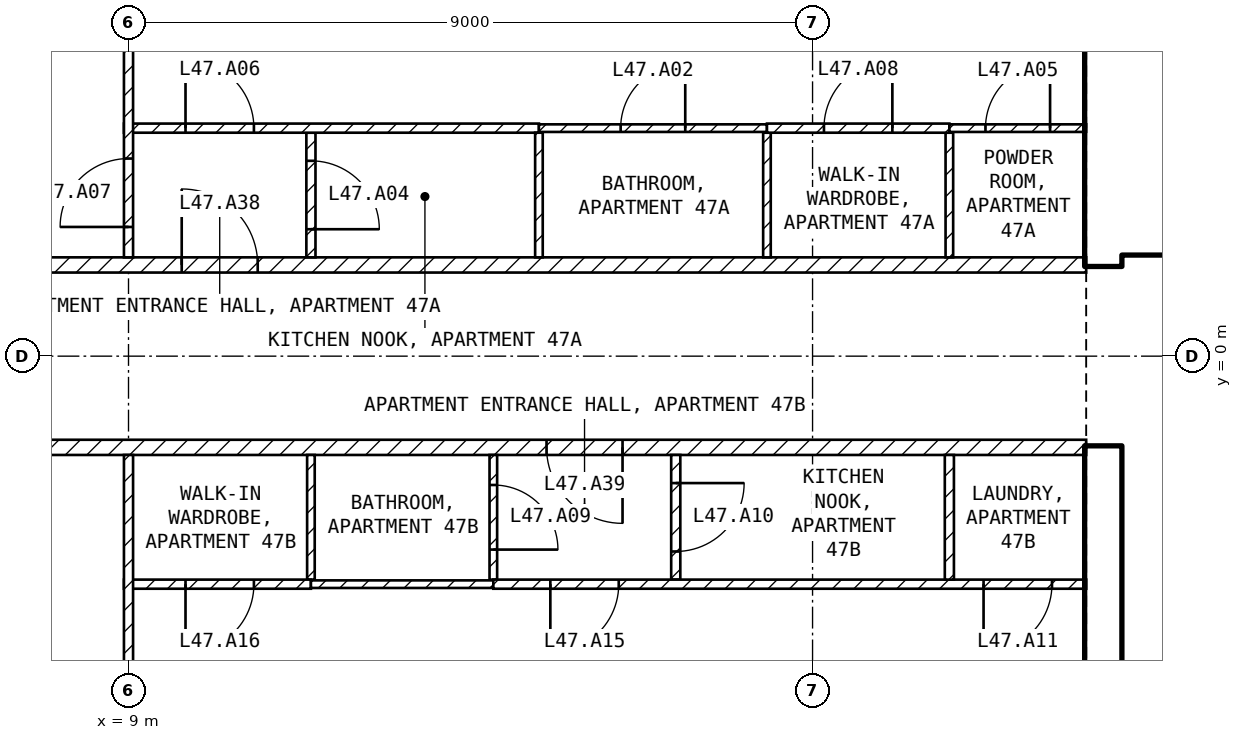
"""IFC4 building model, lengths in metres.
Left out: names, types, materials, properties, quantities, classifications, styles, units other than length and angle.
Written with IfcOpenShell. Run it as: python <this file> out.ifc"""

import sys

from ifc_helpers import new_model, si_unit, direction, frame, frame_2d, origin, place, context, subcontext, project, spatial, rectangle, extrude, element, fill, save


model = new_model("IFC4")
c1 = context("Model", 3, precision=1e-05, world=origin(), true_north=direction((0.0, 1.0)))
c2 = subcontext(c1, "Body", "Model", "MODEL_VIEW")
j1 = project(units=[si_unit("LENGTHUNIT", "METRE"), si_unit("PLANEANGLEUNIT", "RADIAN")], contexts=[c1])
p1 = place(None, origin())
s1 = spatial("IfcSite", under=j1, at=p1, CompositionType="ELEMENT")
p2 = place(p1, origin())
s2 = spatial("IfcBuilding", under=s1, at=p2, CompositionType="ELEMENT")
p3 = place(p2, frame((0.0, 0.0, 191.1)))
s3 = spatial("IfcBuildingStorey", under=s2, at=p3, CompositionType="ELEMENT", Elevation=191.1)
for number, where, z_axis, x_axis in (
    (1, (21.825, -8.1, 0.0), (0.0, 0.0, 1.0), (0.0, 1.0, 0.0)),
    (2, (21.825, 1.2, 0.0), (0.0, 0.0, 1.0), (0.0, 1.0, 0.0)),
):
    element("IfcWall", number, at=place(p3, frame(where, z_axis=z_axis, x_axis=x_axis)), inside=s3, PredefinedType="SHEAR", context=c2, shape_type="SweptSolid", body=[
        extrude(rectangle(XDim=6.9, YDim=0.45, at=frame_2d((3.45, 0.0))), origin(), (0.0, 0.0, 1.0), 3.25),
    ])
p4 = place(p3, frame((22.05, 1.45, 0.0), z_axis=(0.0, 0.0, 1.0), x_axis=(1.0, 0.0, 0.0)))
e3 = element("IfcWall", 3, at=p4, inside=s3, PredefinedType="SOLIDWALL", context=c2, shape_type="SweptSolid", body=[
    extrude(rectangle(XDim=11.15, YDim=0.2, at=frame_2d((5.575, 0.0))), origin(), (0.0, 0.0, 1.0), 3.25),
])
p5 = place(p4, frame((0.75, 0.0, 0.0)))
e4 = element("IfcOpeningElement", 4, at=p5, cuts=e3, PredefinedType="OPENING", context=c2, shape_type="SweptSolid", body=[
    extrude(rectangle(XDim=1.0, YDim=2.1, at=frame_2d((0.5, 1.05))), frame((0.0, 0.11, 0.0), z_axis=(0.0, -1.0, 0.0), x_axis=(1.0, 0.0, 0.0)), (0.0, 0.0, 1.0), 0.22),
])
p6 = place(p4, frame((3.25, 0.0, 0.0)))
e5 = element("IfcOpeningElement", 5, at=p6, cuts=e3, PredefinedType="OPENING", context=c2, shape_type="SweptSolid", body=[
    extrude(rectangle(XDim=1.0, YDim=2.1, at=frame_2d((0.5, 1.05))), frame((0.0, 0.11, 0.0), z_axis=(0.0, -1.0, 0.0), x_axis=(1.0, 0.0, 0.0)), (0.0, 0.0, 1.0), 0.22),
])
p7 = place(p4, frame((9.15, 0.0, 0.0)))
e6 = element("IfcOpeningElement", 6, at=p7, cuts=e3, PredefinedType="OPENING", context=c2, shape_type="SweptSolid", body=[
    extrude(rectangle(XDim=0.9, YDim=2.1, at=frame_2d((0.45, 1.05))), frame((0.0, 0.11, 0.0), z_axis=(0.0, -1.0, 0.0), x_axis=(1.0, 0.0, 0.0)), (0.0, 0.0, 1.0), 0.22),
])
p8 = place(p3, frame((4.4, 1.2, 0.0), z_axis=(0.0, 0.0, 1.0), x_axis=(1.0, 0.0, 0.0)))
e7 = element("IfcWall", 7, at=p8, inside=s3, PredefinedType="PARTITIONING", context=c2, shape_type="SweptSolid", body=[
    extrude(rectangle(XDim=17.2, YDim=0.2, at=frame_2d((8.6, 0.0))), origin(), (0.0, 0.0, 1.0), 3.25),
])
p9 = place(p8, frame((5.3, 0.0, 0.0)))
e8 = element("IfcOpeningElement", 8, at=p9, cuts=e7, PredefinedType="OPENING", context=c2, shape_type="SweptSolid", body=[
    extrude(rectangle(XDim=1.0, YDim=2.1, at=frame_2d((0.5, 1.05))), frame((0.0, 0.11, 0.0), z_axis=(0.0, -1.0, 0.0), x_axis=(1.0, 0.0, 0.0)), (0.0, 0.0, 1.0), 0.22),
])
p10 = place(p3, frame((21.6, -1.2, 0.0), z_axis=(0.0, 0.0, 1.0), x_axis=(-1.0, 0.0, 0.0)))
e9 = element("IfcWall", 9, at=p10, inside=s3, PredefinedType="PARTITIONING", context=c2, shape_type="SweptSolid", body=[
    extrude(rectangle(XDim=17.2, YDim=0.2, at=frame_2d((8.6, 0.0))), origin(), (0.0, 0.0, 1.0), 3.25),
])
p11 = place(p10, frame((6.1, 0.0, 0.0)))
e10 = element("IfcOpeningElement", 10, at=p11, cuts=e9, PredefinedType="OPENING", context=c2, shape_type="SweptSolid", body=[
    extrude(rectangle(XDim=1.0, YDim=2.1, at=frame_2d((0.5, 1.05))), frame((0.0, 0.11, 0.0), z_axis=(0.0, -1.0, 0.0), x_axis=(1.0, 0.0, 0.0)), (0.0, 0.0, 1.0), 0.22),
])
p12 = place(p3, frame((11.4, 2.94, 0.0), z_axis=(0.0, 0.0, 1.0), x_axis=(0.0, -1.0, 0.0)))
e11 = element("IfcWall", 11, at=p12, inside=s3, PredefinedType="PARTITIONING", context=c2, shape_type="SweptSolid", body=[
    extrude(rectangle(XDim=1.64, YDim=0.12, at=frame_2d((0.82, 0.0))), origin(), (0.0, 0.0, 1.0), 3.25),
])
p13 = place(p12, frame((0.37, 0.0, 0.0)))
e12 = element("IfcOpeningElement", 12, at=p13, cuts=e11, PredefinedType="OPENING", context=c2, shape_type="SweptSolid", body=[
    extrude(rectangle(XDim=0.9, YDim=2.1, at=frame_2d((0.45, 1.05))), frame((0.0, 0.07, 0.0), z_axis=(0.0, -1.0, 0.0), x_axis=(1.0, 0.0, 0.0)), (0.0, 0.0, 1.0), 0.14),
])
p14 = place(p3, frame((8.94, 3.0, 0.0), z_axis=(0.0, 0.0, 1.0), x_axis=(1.0, 0.0, 0.0)))
e13 = element("IfcWall", 13, at=p14, inside=s3, PredefinedType="PARTITIONING", context=c2, shape_type="SweptSolid", body=[
    extrude(rectangle(XDim=5.46, YDim=0.12, at=frame_2d((2.73, 0.0))), origin(), (0.0, 0.0, 1.0), 3.25),
])
p15 = place(p14, frame((0.81, 0.0, 0.0)))
e14 = element("IfcOpeningElement", 14, at=p15, cuts=e13, PredefinedType="OPENING", context=c2, shape_type="SweptSolid", body=[
    extrude(rectangle(XDim=0.9, YDim=2.1, at=frame_2d((0.45, 1.05))), frame((0.0, 0.07, 0.0), z_axis=(0.0, -1.0, 0.0), x_axis=(1.0, 0.0, 0.0)), (0.0, 0.0, 1.0), 0.14),
])
p16 = place(p3, frame((9.0, 1.3, 0.0), z_axis=(0.0, 0.0, 1.0), x_axis=(0.0, 1.0, 0.0)))
e15 = element("IfcWall", 15, at=p16, inside=s3, PredefinedType="PARTITIONING", context=c2, shape_type="SweptSolid", body=[
    extrude(rectangle(XDim=7.62, YDim=0.12, at=frame_2d((3.81, 0.0))), origin(), (0.0, 0.0, 1.0), 3.25),
])
p17 = place(p16, frame((0.4, 0.0, 0.0)))
e16 = element("IfcOpeningElement", 16, at=p17, cuts=e15, PredefinedType="OPENING", context=c2, shape_type="SweptSolid", body=[
    extrude(rectangle(XDim=0.9, YDim=2.1, at=frame_2d((0.45, 1.05))), frame((0.0, 0.07, 0.0), z_axis=(0.0, -1.0, 0.0), x_axis=(1.0, 0.0, 0.0)), (0.0, 0.0, 1.0), 0.14),
])
for number, where, z_axis, x_axis in (
    (17, (14.4, 2.94, 0.0), (0.0, 0.0, 1.0), (0.0, -1.0, 0.0)),
    (18, (17.4, 2.94, 0.0), (0.0, 0.0, 1.0), (0.0, -1.0, 0.0)),
):
    element("IfcWall", number, at=place(p3, frame(where, z_axis=z_axis, x_axis=x_axis)), inside=s3, PredefinedType="PARTITIONING", context=c2, shape_type="SweptSolid", body=[
        extrude(rectangle(XDim=1.64, YDim=0.1, at=frame_2d((0.82, 0.0))), origin(), (0.0, 0.0, 1.0), 3.25),
    ])
p18 = place(p3, frame((14.4, 3.0, 0.0), z_axis=(0.0, 0.0, 1.0), x_axis=(1.0, 0.0, 0.0)))
e19 = element("IfcWall", 19, at=p18, inside=s3, PredefinedType="PARTITIONING", context=c2, shape_type="SweptSolid", body=[
    extrude(rectangle(XDim=3.0, YDim=0.1, at=frame_2d((1.5, 0.0))), origin(), (0.0, 0.0, 1.0), 3.25),
])
p19 = place(p18, frame((1.075, 0.0, 0.0)))
e20 = element("IfcOpeningElement", 20, at=p19, cuts=e19, PredefinedType="OPENING", context=c2, shape_type="SweptSolid", body=[
    extrude(rectangle(XDim=0.85, YDim=2.1, at=frame_2d((0.425, 1.05))), frame((0.0, 0.06, 0.0), z_axis=(0.0, -1.0, 0.0), x_axis=(1.0, 0.0, 0.0)), (0.0, 0.0, 1.0), 0.12),
])
p20 = place(p3, frame((19.8, 2.94, 0.0), z_axis=(0.0, 0.0, 1.0), x_axis=(0.0, -1.0, 0.0)))
e21 = element("IfcWall", 21, at=p20, inside=s3, PredefinedType="PARTITIONING", context=c2, shape_type="SweptSolid", body=[
    extrude(rectangle(XDim=1.64, YDim=0.1, at=frame_2d((0.82, 0.0))), origin(), (0.0, 0.0, 1.0), 3.25),
])
p21 = place(p3, frame((17.4, 3.0, 0.0), z_axis=(0.0, 0.0, 1.0), x_axis=(1.0, 0.0, 0.0)))
e22 = element("IfcWall", 22, at=p21, inside=s3, PredefinedType="PARTITIONING", context=c2, shape_type="SweptSolid", body=[
    extrude(rectangle(XDim=2.4, YDim=0.12, at=frame_2d((1.2, 0.0))), origin(), (0.0, 0.0, 1.0), 3.25),
])
p22 = place(p21, frame((0.75, 0.0, 0.0)))
e23 = element("IfcOpeningElement", 23, at=p22, cuts=e22, PredefinedType="OPENING", context=c2, shape_type="SweptSolid", body=[
    extrude(rectangle(XDim=0.9, YDim=2.1, at=frame_2d((0.45, 1.05))), frame((0.0, 0.07, 0.0), z_axis=(0.0, -1.0, 0.0), x_axis=(1.0, 0.0, 0.0)), (0.0, 0.0, 1.0), 0.14),
])
p23 = place(p3, frame((19.8, 3.0, 0.0), z_axis=(0.0, 0.0, 1.0), x_axis=(1.0, 0.0, 0.0)))
e24 = element("IfcWall", 24, at=p23, inside=s3, PredefinedType="PARTITIONING", context=c2, shape_type="SweptSolid", body=[
    extrude(rectangle(XDim=1.8, YDim=0.1, at=frame_2d((0.9, 0.0))), origin(), (0.0, 0.0, 1.0), 3.25),
])
p24 = place(p23, frame((0.475, 0.0, 0.0)))
e25 = element("IfcOpeningElement", 25, at=p24, cuts=e24, PredefinedType="OPENING", context=c2, shape_type="SweptSolid", body=[
    extrude(rectangle(XDim=0.85, YDim=2.1, at=frame_2d((0.425, 1.05))), frame((0.0, 0.06, 0.0), z_axis=(0.0, -1.0, 0.0), x_axis=(1.0, 0.0, 0.0)), (0.0, 0.0, 1.0), 0.12),
])
p25 = place(p3, frame((11.4, -1.3, 0.0), z_axis=(0.0, 0.0, 1.0), x_axis=(0.0, -1.0, 0.0)))
e26 = element("IfcWall", 26, at=p25, inside=s3, PredefinedType="PARTITIONING", context=c2, shape_type="SweptSolid", body=[
    extrude(rectangle(XDim=1.64, YDim=0.1, at=frame_2d((0.82, 0.0))), origin(), (0.0, 0.0, 1.0), 3.25),
])
p26 = place(p3, frame((11.4, -3.0, 0.0), z_axis=(0.0, 0.0, 1.0), x_axis=(-1.0, 0.0, 0.0)))
e27 = element("IfcWall", 27, at=p26, inside=s3, PredefinedType="PARTITIONING", context=c2, shape_type="SweptSolid", body=[
    extrude(rectangle(XDim=2.46, YDim=0.12, at=frame_2d((1.23, 0.0))), origin(), (0.0, 0.0, 1.0), 3.25),
])
p27 = place(p26, frame((0.75, 0.0, 0.0)))
e28 = element("IfcOpeningElement", 28, at=p27, cuts=e27, PredefinedType="OPENING", context=c2, shape_type="SweptSolid", body=[
    extrude(rectangle(XDim=0.9, YDim=2.1, at=frame_2d((0.45, 1.05))), frame((0.0, 0.07, 0.0), z_axis=(0.0, -1.0, 0.0), x_axis=(1.0, 0.0, 0.0)), (0.0, 0.0, 1.0), 0.14),
])
p28 = place(p3, frame((9.0, -8.92, 0.0), z_axis=(0.0, 0.0, 1.0), x_axis=(0.0, 1.0, 0.0)))
e29 = element("IfcWall", 29, at=p28, inside=s3, PredefinedType="PARTITIONING", context=c2, shape_type="SweptSolid", body=[
    extrude(rectangle(XDim=7.62, YDim=0.12, at=frame_2d((3.81, 0.0))), origin(), (0.0, 0.0, 1.0), 3.25),
])
p29 = place(p28, frame((2.62, 0.0, 0.0)))
e30 = element("IfcOpeningElement", 30, at=p29, cuts=e29, PredefinedType="OPENING", context=c2, shape_type="SweptSolid", body=[
    extrude(rectangle(XDim=0.9, YDim=2.1, at=frame_2d((0.45, 1.05))), frame((0.0, 0.07, 0.0), z_axis=(0.0, -1.0, 0.0), x_axis=(1.0, 0.0, 0.0)), (0.0, 0.0, 1.0), 0.14),
])
p30 = place(p3, frame((13.8, -1.3, 0.0), z_axis=(0.0, 0.0, 1.0), x_axis=(0.0, -1.0, 0.0)))
e31 = element("IfcWall", 31, at=p30, inside=s3, PredefinedType="PARTITIONING", context=c2, shape_type="SweptSolid", body=[
    extrude(rectangle(XDim=1.64, YDim=0.1, at=frame_2d((0.82, 0.0))), origin(), (0.0, 0.0, 1.0), 3.25),
])
p31 = place(p30, frame((0.395, 0.0, 0.0)))
e32 = element("IfcOpeningElement", 32, at=p31, cuts=e31, PredefinedType="OPENING", context=c2, shape_type="SweptSolid", body=[
    extrude(rectangle(XDim=0.85, YDim=2.1, at=frame_2d((0.425, 1.05))), frame((0.0, 0.06, 0.0), z_axis=(0.0, -1.0, 0.0), x_axis=(1.0, 0.0, 0.0)), (0.0, 0.0, 1.0), 0.12),
])
p32 = place(p3, frame((13.8, -3.0, 0.0), z_axis=(0.0, 0.0, 1.0), x_axis=(-1.0, 0.0, 0.0)))
e33 = element("IfcWall", 33, at=p32, inside=s3, PredefinedType="PARTITIONING", context=c2, shape_type="SweptSolid", body=[
    extrude(rectangle(XDim=2.4, YDim=0.1, at=frame_2d((1.2, 0.0))), origin(), (0.0, 0.0, 1.0), 3.25),
])
p33 = place(p3, frame((16.2, -1.3, 0.0), z_axis=(0.0, 0.0, 1.0), x_axis=(0.0, -1.0, 0.0)))
e34 = element("IfcWall", 34, at=p33, inside=s3, PredefinedType="PARTITIONING", context=c2, shape_type="SweptSolid", body=[
    extrude(rectangle(XDim=1.64, YDim=0.12, at=frame_2d((0.82, 0.0))), origin(), (0.0, 0.0, 1.0), 3.25),
])
p34 = place(p33, frame((0.37, 0.0, 0.0)))
e35 = element("IfcOpeningElement", 35, at=p34, cuts=e34, PredefinedType="OPENING", context=c2, shape_type="SweptSolid", body=[
    extrude(rectangle(XDim=0.9, YDim=2.1, at=frame_2d((0.45, 1.05))), frame((0.0, 0.07, 0.0), z_axis=(0.0, -1.0, 0.0), x_axis=(1.0, 0.0, 0.0)), (0.0, 0.0, 1.0), 0.14),
])
p35 = place(p3, frame((21.6, -3.0, 0.0), z_axis=(0.0, 0.0, 1.0), x_axis=(-1.0, 0.0, 0.0)))
e36 = element("IfcWall", 36, at=p35, inside=s3, PredefinedType="PARTITIONING", context=c2, shape_type="SweptSolid", body=[
    extrude(rectangle(XDim=7.8, YDim=0.12, at=frame_2d((3.9, 0.0))), origin(), (0.0, 0.0, 1.0), 3.25),
])
p36 = place(p35, frame((0.45, 0.0, 0.0)))
e37 = element("IfcOpeningElement", 37, at=p36, cuts=e36, PredefinedType="OPENING", context=c2, shape_type="SweptSolid", body=[
    extrude(rectangle(XDim=0.9, YDim=2.1, at=frame_2d((0.45, 1.05))), frame((0.0, 0.07, 0.0), z_axis=(0.0, -1.0, 0.0), x_axis=(1.0, 0.0, 0.0)), (0.0, 0.0, 1.0), 0.14),
])
p37 = place(p35, frame((6.15, 0.0, 0.0)))
e38 = element("IfcOpeningElement", 38, at=p37, cuts=e36, PredefinedType="OPENING", context=c2, shape_type="SweptSolid", body=[
    extrude(rectangle(XDim=0.9, YDim=2.1, at=frame_2d((0.45, 1.05))), frame((0.0, 0.07, 0.0), z_axis=(0.0, -1.0, 0.0), x_axis=(1.0, 0.0, 0.0)), (0.0, 0.0, 1.0), 0.14),
])
p38 = place(p3, frame((19.8, -1.3, 0.0), z_axis=(0.0, 0.0, 1.0), x_axis=(0.0, -1.0, 0.0)))
e39 = element("IfcWall", 39, at=p38, inside=s3, PredefinedType="PARTITIONING", context=c2, shape_type="SweptSolid", body=[
    extrude(rectangle(XDim=1.64, YDim=0.12, at=frame_2d((0.82, 0.0))), origin(), (0.0, 0.0, 1.0), 3.25),
])
p39 = place(p19, origin())
e40 = element("IfcDoor", 40, at=p39, inside=s3, OperationType="SINGLE_SWING_RIGHT", PredefinedType="DOOR", context=c2, shape_type="SweptSolid", body=[
    extrude(rectangle(XDim=0.85, YDim=2.1, at=frame_2d((0.425, 1.05))), frame((0.0, 0.025, 0.0), z_axis=(0.0, -1.0, 0.0), x_axis=(1.0, 0.0, 0.0)), (0.0, 0.0, 1.0), 0.05),
])
fill(e20, e40)
p40 = place(p13, origin())
e41 = element("IfcDoor", 41, at=p40, inside=s3, OperationType="SINGLE_SWING_RIGHT", PredefinedType="DOOR", context=c2, shape_type="SweptSolid", body=[
    extrude(rectangle(XDim=0.9, YDim=2.1, at=frame_2d((0.45, 1.05))), frame((0.0, 0.025, 0.0), z_axis=(0.0, -1.0, 0.0), x_axis=(1.0, 0.0, 0.0)), (0.0, 0.0, 1.0), 0.05),
])
fill(e12, e41)
p41 = place(p24, origin())
e42 = element("IfcDoor", 42, at=p41, inside=s3, OperationType="SINGLE_SWING_RIGHT", PredefinedType="DOOR", context=c2, shape_type="SweptSolid", body=[
    extrude(rectangle(XDim=0.85, YDim=2.1, at=frame_2d((0.425, 1.05))), frame((0.0, 0.025, 0.0), z_axis=(0.0, -1.0, 0.0), x_axis=(1.0, 0.0, 0.0)), (0.0, 0.0, 1.0), 0.05),
])
fill(e25, e42)
p42 = place(p15, origin())
e43 = element("IfcDoor", 43, at=p42, inside=s3, OperationType="SINGLE_SWING_LEFT", PredefinedType="DOOR", context=c2, shape_type="SweptSolid", body=[
    extrude(rectangle(XDim=0.9, YDim=2.1, at=frame_2d((0.45, 1.05))), frame((0.0, 0.025, 0.0), z_axis=(0.0, -1.0, 0.0), x_axis=(1.0, 0.0, 0.0)), (0.0, 0.0, 1.0), 0.05),
])
fill(e14, e43)
p43 = place(p17, origin())
e44 = element("IfcDoor", 44, at=p43, inside=s3, OperationType="SINGLE_SWING_LEFT", PredefinedType="DOOR", context=c2, shape_type="SweptSolid", body=[
    extrude(rectangle(XDim=0.9, YDim=2.1, at=frame_2d((0.45, 1.05))), frame((0.0, 0.025, 0.0), z_axis=(0.0, -1.0, 0.0), x_axis=(1.0, 0.0, 0.0)), (0.0, 0.0, 1.0), 0.05),
])
fill(e16, e44)
p44 = place(p22, origin())
e45 = element("IfcDoor", 45, at=p44, inside=s3, OperationType="SINGLE_SWING_RIGHT", PredefinedType="DOOR", context=c2, shape_type="SweptSolid", body=[
    extrude(rectangle(XDim=0.9, YDim=2.1, at=frame_2d((0.45, 1.05))), frame((0.0, 0.025, 0.0), z_axis=(0.0, -1.0, 0.0), x_axis=(1.0, 0.0, 0.0)), (0.0, 0.0, 1.0), 0.05),
])
fill(e23, e45)
p45 = place(p31, origin())
e46 = element("IfcDoor", 46, at=p45, inside=s3, OperationType="SINGLE_SWING_RIGHT", PredefinedType="DOOR", context=c2, shape_type="SweptSolid", body=[
    extrude(rectangle(XDim=0.85, YDim=2.1, at=frame_2d((0.425, 1.05))), frame((0.0, 0.025, 0.0), z_axis=(0.0, -1.0, 0.0), x_axis=(1.0, 0.0, 0.0)), (0.0, 0.0, 1.0), 0.05),
])
fill(e32, e46)
p46 = place(p34, origin())
e47 = element("IfcDoor", 47, at=p46, inside=s3, OperationType="SINGLE_SWING_LEFT", PredefinedType="DOOR", context=c2, shape_type="SweptSolid", body=[
    extrude(rectangle(XDim=0.9, YDim=2.1, at=frame_2d((0.45, 1.05))), frame((0.0, 0.025, 0.0), z_axis=(0.0, -1.0, 0.0), x_axis=(1.0, 0.0, 0.0)), (0.0, 0.0, 1.0), 0.05),
])
fill(e35, e47)
p47 = place(p36, origin())
e48 = element("IfcDoor", 48, at=p47, inside=s3, OperationType="SINGLE_SWING_RIGHT", PredefinedType="DOOR", context=c2, shape_type="SweptSolid", body=[
    extrude(rectangle(XDim=0.9, YDim=2.1, at=frame_2d((0.45, 1.05))), frame((0.0, 0.025, 0.0), z_axis=(0.0, -1.0, 0.0), x_axis=(1.0, 0.0, 0.0)), (0.0, 0.0, 1.0), 0.05),
])
fill(e37, e48)
p48 = place(p37, origin())
e49 = element("IfcDoor", 49, at=p48, inside=s3, OperationType="SINGLE_SWING_RIGHT", PredefinedType="DOOR", context=c2, shape_type="SweptSolid", body=[
    extrude(rectangle(XDim=0.9, YDim=2.1, at=frame_2d((0.45, 1.05))), frame((0.0, 0.025, 0.0), z_axis=(0.0, -1.0, 0.0), x_axis=(1.0, 0.0, 0.0)), (0.0, 0.0, 1.0), 0.05),
])
fill(e38, e49)
p49 = place(p27, origin())
e50 = element("IfcDoor", 50, at=p49, inside=s3, OperationType="SINGLE_SWING_RIGHT", PredefinedType="DOOR", context=c2, shape_type="SweptSolid", body=[
    extrude(rectangle(XDim=0.9, YDim=2.1, at=frame_2d((0.45, 1.05))), frame((0.0, 0.025, 0.0), z_axis=(0.0, -1.0, 0.0), x_axis=(1.0, 0.0, 0.0)), (0.0, 0.0, 1.0), 0.05),
])
fill(e28, e50)
p50 = place(p9, origin())
e51 = element("IfcDoor", 51, at=p50, inside=s3, OperationType="SINGLE_SWING_LEFT", PredefinedType="DOOR", context=c2, shape_type="SweptSolid", body=[
    extrude(rectangle(XDim=1.0, YDim=2.1, at=frame_2d((0.5, 1.05))), frame((0.0, 0.025, 0.0), z_axis=(0.0, -1.0, 0.0), x_axis=(1.0, 0.0, 0.0)), (0.0, 0.0, 1.0), 0.05),
])
fill(e8, e51)
p51 = place(p11, origin())
e52 = element("IfcDoor", 52, at=p51, inside=s3, OperationType="SINGLE_SWING_LEFT", PredefinedType="DOOR", context=c2, shape_type="SweptSolid", body=[
    extrude(rectangle(XDim=1.0, YDim=2.1, at=frame_2d((0.5, 1.05))), frame((0.0, 0.025, 0.0), z_axis=(0.0, -1.0, 0.0), x_axis=(1.0, 0.0, 0.0)), (0.0, 0.0, 1.0), 0.05),
])
fill(e10, e52)
save(model, sys.argv[1])
